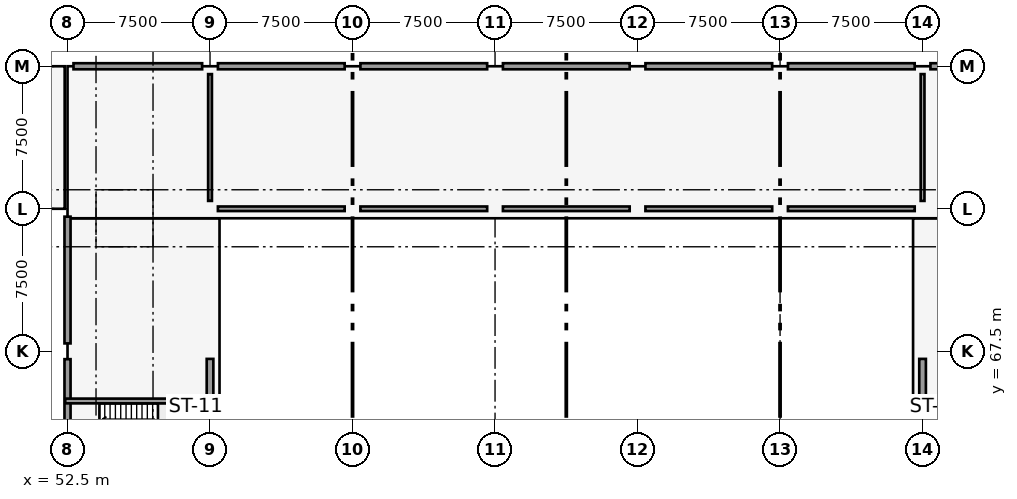
"""IFC4 building model, lengths in metres.
Left out: names, types, materials, properties, quantities, classifications, styles, units other than length and angle.
Written with IfcOpenShell. Run it as: python <this file> out.ifc"""

import sys

from ifc_helpers import new_model, si_unit, direction, frame, frame_2d, origin, origin_2d, place, context, subcontext, project, spatial, rectangle, extrude, element, fill, save


model = new_model("IFC4")
c1 = context("Model", 3, precision=1e-05, world=origin(), true_north=direction((0.0, 1.0)))
c2 = subcontext(c1, "Body", "Model", "MODEL_VIEW")
j1 = project(units=[si_unit("LENGTHUNIT", "METRE"), si_unit("PLANEANGLEUNIT", "RADIAN")], contexts=[c1])
p1 = place(None, origin())
s1 = spatial("IfcSite", under=j1, at=p1, CompositionType="ELEMENT")
p2 = place(p1, origin())
s2 = spatial("IfcBuilding", under=s1, at=p2, CompositionType="ELEMENT")
p3 = place(p2, frame((0.0, 0.0, 9.0)))
s3 = spatial("IfcBuildingStorey", under=s2, at=p3, CompositionType="ELEMENT", Elevation=9.0)
for number, where, z_axis, x_axis in (
    (1, (52.5, 67.5, 0.0), (0.0, 0.0, 1.0), (1.0, 0.0, 0.0)),
    (2, (52.5, 75.0, 0.0), (0.0, 0.0, 1.0), (1.0, 0.0, 0.0)),
):
    element("IfcColumn", number, at=place(p3, frame(where, z_axis=z_axis, x_axis=x_axis)), inside=s3, PredefinedType="COLUMN", context=c2, shape_type="SweptSolid", body=[
        extrude(rectangle(XDim=0.8, YDim=0.8, at=origin_2d()), origin(), (0.0, 0.0, 1.0), 4.2),
    ])
p4 = place(p3, frame((52.5, 82.5, 0.0), z_axis=(0.0, 0.0, 1.0), x_axis=(1.0, 0.0, 0.0)))
e3 = element("IfcColumn", 3, at=p4, inside=s3, PredefinedType="COLUMN", context=c2, shape_type="SweptSolid", body=[
    extrude(rectangle(XDim=0.6, YDim=1.1, at=origin_2d()), origin(), (0.0, 0.0, 1.0), 4.2),
])
for number, where, z_axis, x_axis in (
    (4, (60.0, 67.5, 0.0), (0.0, 0.0, 1.0), (1.0, 0.0, 0.0)),
    (5, (60.0, 75.0, 0.0), (0.0, 0.0, 1.0), (1.0, 0.0, 0.0)),
    (6, (60.0, 82.5, 0.0), (0.0, 0.0, 1.0), (1.0, 0.0, 0.0)),
    (7, (67.5, 75.0, 0.0), (0.0, 0.0, 1.0), (1.0, 0.0, 0.0)),
    (8, (67.5, 82.5, 0.0), (0.0, 0.0, 1.0), (1.0, 0.0, 0.0)),
    (9, (75.0, 75.0, 0.0), (0.0, 0.0, 1.0), (1.0, 0.0, 0.0)),
    (10, (75.0, 82.5, 0.0), (0.0, 0.0, 1.0), (1.0, 0.0, 0.0)),
    (11, (82.5, 75.0, 0.0), (0.0, 0.0, 1.0), (1.0, 0.0, 0.0)),
    (12, (82.5, 82.5, 0.0), (0.0, 0.0, 1.0), (1.0, 0.0, 0.0)),
    (13, (90.0, 75.0, 0.0), (0.0, 0.0, 1.0), (1.0, 0.0, 0.0)),
    (14, (90.0, 82.5, 0.0), (0.0, 0.0, 1.0), (1.0, 0.0, 0.0)),
    (15, (97.5, 67.5, 0.0), (0.0, 0.0, 1.0), (1.0, 0.0, 0.0)),
    (16, (97.5, 75.0, 0.0), (0.0, 0.0, 1.0), (1.0, 0.0, 0.0)),
    (17, (97.5, 82.5, 0.0), (0.0, 0.0, 1.0), (1.0, 0.0, 0.0)),
):
    element("IfcColumn", number, at=place(p3, frame(where, z_axis=z_axis, x_axis=x_axis)), inside=s3, PredefinedType="COLUMN", context=c2, shape_type="SweptSolid", body=[
        extrude(rectangle(XDim=0.8, YDim=0.8, at=origin_2d()), origin(), (0.0, 0.0, 1.0), 4.2),
    ])
p5 = place(p3, frame((60.0, 60.4, 0.0), z_axis=(0.0, 0.0, 1.0), x_axis=(0.0, 1.0, 0.0)))
e18 = element("IfcWall", 18, at=p5, inside=s3, PredefinedType="SHEAR", context=c2, shape_type="SweptSolid", body=[
    extrude(rectangle(XDim=6.7, YDim=0.35, at=frame_2d((3.35, 0.0))), origin(), (0.0, 0.0, 1.0), 2.85),
])
p6 = place(p3, frame((97.5, 60.4, 0.0), z_axis=(0.0, 0.0, 1.0), x_axis=(0.0, 1.0, 0.0)))
e19 = element("IfcWall", 19, at=p6, inside=s3, PredefinedType="SHEAR", context=c2, shape_type="SweptSolid", body=[
    extrude(rectangle(XDim=6.7, YDim=0.35, at=frame_2d((3.35, 0.0))), origin(), (0.0, 0.0, 1.0), 3.0),
])
p7 = place(p3, frame((52.5, 60.415, 0.0), z_axis=(0.0, 0.0, 1.0), x_axis=(0.0, 1.0, 0.0)))
e20 = element("IfcWall", 20, at=p7, inside=s3, PredefinedType="SOLIDWALL", context=c2, shape_type="SweptSolid", body=[
    extrude(rectangle(XDim=6.67, YDim=0.32, at=frame_2d((3.335, 0.0))), origin(), (0.0, 0.0, 1.0), 2.82),
])
p8 = place(p3, frame((52.5, 67.915, 0.0), z_axis=(0.0, 0.0, 1.0), x_axis=(0.0, 1.0, 0.0)))
e21 = element("IfcWall", 21, at=p8, inside=s3, PredefinedType="SOLIDWALL", context=c2, shape_type="SweptSolid", body=[
    extrude(rectangle(XDim=6.67, YDim=0.32, at=frame_2d((3.335, 0.0))), origin(), (0.0, 0.0, 1.0), 2.92),
])
p9 = place(p3, frame((52.815, 82.5, 0.0), z_axis=(0.0, 0.0, 1.0), x_axis=(1.0, 0.0, 0.0)))
e22 = element("IfcWall", 22, at=p9, inside=s3, PredefinedType="SOLIDWALL", context=c2, shape_type="SweptSolid", body=[
    extrude(rectangle(XDim=6.77, YDim=0.32, at=frame_2d((3.385, 0.0))), origin(), (0.0, 0.0, 1.0), 3.12),
])
p10 = place(p9, frame((2.86, 0.0, 0.6)))
e23 = element("IfcOpeningElement", 23, at=p10, cuts=e22, PredefinedType="OPENING", context=c2, shape_type="SweptSolid", body=[
    extrude(rectangle(XDim=1.15, YDim=1.3, at=frame_2d((0.575, 0.65))), frame((0.0, 0.17, 0.0), z_axis=(0.0, -1.0, 0.0), x_axis=(1.0, 0.0, 0.0)), (0.0, 0.0, 1.0), 0.34),
])
p11 = place(p3, frame((60.415, 82.5, 0.0), z_axis=(0.0, 0.0, 1.0), x_axis=(1.0, 0.0, 0.0)))
e24 = element("IfcWall", 24, at=p11, inside=s3, PredefinedType="SOLIDWALL", context=c2, shape_type="SweptSolid", body=[
    extrude(rectangle(XDim=6.67, YDim=0.32, at=frame_2d((3.335, 0.0))), origin(), (0.0, 0.0, 1.0), 3.12),
])
p12 = place(p11, frame((2.685, 0.0, 0.6)))
e25 = element("IfcOpeningElement", 25, at=p12, cuts=e24, PredefinedType="OPENING", context=c2, shape_type="SweptSolid", body=[
    extrude(rectangle(XDim=1.3, YDim=1.3, at=frame_2d((0.65, 0.65))), frame((0.0, 0.17, 0.0), z_axis=(0.0, -1.0, 0.0), x_axis=(1.0, 0.0, 0.0)), (0.0, 0.0, 1.0), 0.34),
])
p13 = place(p3, frame((67.915, 82.5, 0.0), z_axis=(0.0, 0.0, 1.0), x_axis=(1.0, 0.0, 0.0)))
e26 = element("IfcWall", 26, at=p13, inside=s3, PredefinedType="SOLIDWALL", context=c2, shape_type="SweptSolid", body=[
    extrude(rectangle(XDim=6.67, YDim=0.32, at=frame_2d((3.335, 0.0))), origin(), (0.0, 0.0, 1.0), 3.12),
])
p14 = place(p3, frame((75.415, 82.5, 0.0), z_axis=(0.0, 0.0, 1.0), x_axis=(1.0, 0.0, 0.0)))
e27 = element("IfcWall", 27, at=p14, inside=s3, PredefinedType="SOLIDWALL", context=c2, shape_type="SweptSolid", body=[
    extrude(rectangle(XDim=6.67, YDim=0.32, at=frame_2d((3.335, 0.0))), origin(), (0.0, 0.0, 1.0), 3.12),
])
p15 = place(p14, frame((2.535, 0.0, 0.6)))
e28 = element("IfcOpeningElement", 28, at=p15, cuts=e27, PredefinedType="OPENING", context=c2, shape_type="SweptSolid", body=[
    extrude(rectangle(XDim=1.6, YDim=1.3, at=frame_2d((0.8, 0.65))), frame((0.0, 0.17, 0.0), z_axis=(0.0, -1.0, 0.0), x_axis=(1.0, 0.0, 0.0)), (0.0, 0.0, 1.0), 0.34),
])
p16 = place(p3, frame((82.915, 82.5, 0.0), z_axis=(0.0, 0.0, 1.0), x_axis=(1.0, 0.0, 0.0)))
e29 = element("IfcWall", 29, at=p16, inside=s3, PredefinedType="SOLIDWALL", context=c2, shape_type="SweptSolid", body=[
    extrude(rectangle(XDim=6.67, YDim=0.32, at=frame_2d((3.335, 0.0))), origin(), (0.0, 0.0, 1.0), 3.12),
])
p17 = place(p3, frame((90.415, 82.5, 0.0), z_axis=(0.0, 0.0, 1.0), x_axis=(1.0, 0.0, 0.0)))
e30 = element("IfcWall", 30, at=p17, inside=s3, PredefinedType="SOLIDWALL", context=c2, shape_type="SweptSolid", body=[
    extrude(rectangle(XDim=6.67, YDim=0.32, at=frame_2d((3.335, 0.0))), origin(), (0.0, 0.0, 1.0), 3.12),
])
p18 = place(p17, frame((2.36, 0.0, 0.6)))
e31 = element("IfcOpeningElement", 31, at=p18, cuts=e30, PredefinedType="OPENING", context=c2, shape_type="SweptSolid", body=[
    extrude(rectangle(XDim=1.95, YDim=1.3, at=frame_2d((0.975, 0.65))), frame((0.0, 0.17, 0.0), z_axis=(0.0, -1.0, 0.0), x_axis=(1.0, 0.0, 0.0)), (0.0, 0.0, 1.0), 0.34),
])
p19 = place(p3, frame((97.915, 82.5, 0.0), z_axis=(0.0, 0.0, 1.0), x_axis=(1.0, 0.0, 0.0)))
e32 = element("IfcWall", 32, at=p19, inside=s3, PredefinedType="SOLIDWALL", context=c2, shape_type="SweptSolid", body=[
    extrude(rectangle(XDim=6.78, YDim=0.32, at=frame_2d((3.39, 0.0))), origin(), (0.0, 0.0, 1.0), 3.12),
])
p20 = place(p19, frame((2.285, 0.0, 0.6)))
e33 = element("IfcOpeningElement", 33, at=p20, cuts=e32, PredefinedType="OPENING", context=c2, shape_type="SweptSolid", body=[
    extrude(rectangle(XDim=2.1, YDim=1.3, at=frame_2d((1.05, 0.65))), frame((0.0, 0.17, 0.0), z_axis=(0.0, -1.0, 0.0), x_axis=(1.0, 0.0, 0.0)), (0.0, 0.0, 1.0), 0.34),
])
p21 = place(p3, frame((52.38, 64.885, 0.0), z_axis=(0.0, 0.0, 1.0), x_axis=(1.0, 0.0, 0.0)))
e34 = element("IfcWall", 34, at=p21, inside=s3, PredefinedType="SOLIDWALL", context=c2, shape_type="SweptSolid", body=[
    extrude(rectangle(XDim=7.26, YDim=0.25, at=frame_2d((3.63, 0.0))), origin(), (0.0, 0.0, 1.0), 3.92),
])
p22 = place(p21, frame((0.62, 0.0, 0.0)))
e35 = element("IfcOpeningElement", 35, at=p22, cuts=e34, PredefinedType="OPENING", context=c2, shape_type="SweptSolid", body=[
    extrude(rectangle(XDim=1.1, YDim=2.15, at=frame_2d((0.55, 1.075))), frame((0.0, 0.135, 0.0), z_axis=(0.0, -1.0, 0.0), x_axis=(1.0, 0.0, 0.0)), (0.0, 0.0, 1.0), 0.27),
])
p23 = place(p3, frame((59.645, 61.2, 0.0), z_axis=(0.0, 0.0, 1.0), x_axis=(0.0, 1.0, 0.0)))
e36 = element("IfcWall", 36, at=p23, inside=s3, PredefinedType="SOLIDWALL", context=c2, shape_type="SweptSolid", body=[
    extrude(rectangle(XDim=3.56, YDim=0.25, at=frame_2d((1.78, 0.0))), origin(), (0.0, 0.0, 1.0), 3.92),
])
p24 = place(p3, frame((97.86, 64.885, 0.0), z_axis=(0.0, 0.0, 1.0), x_axis=(1.0, 0.0, 0.0)))
e37 = element("IfcWall", 37, at=p24, inside=s3, PredefinedType="SOLIDWALL", context=c2, shape_type="SweptSolid", body=[
    extrude(rectangle(XDim=7.26, YDim=0.25, at=frame_2d((3.63, 0.0))), origin(), (0.0, 0.0, 1.0), 3.92),
])
p25 = place(p24, frame((5.54, 0.0, 0.0)))
e38 = element("IfcOpeningElement", 38, at=p25, cuts=e37, PredefinedType="OPENING", context=c2, shape_type="SweptSolid", body=[
    extrude(rectangle(XDim=1.1, YDim=2.15, at=frame_2d((0.55, 1.075))), frame((0.0, 0.135, 0.0), z_axis=(0.0, -1.0, 0.0), x_axis=(1.0, 0.0, 0.0)), (0.0, 0.0, 1.0), 0.27),
])
p26 = place(p3, frame((97.855, 61.2, 0.0), z_axis=(0.0, 0.0, 1.0), x_axis=(0.0, 1.0, 0.0)))
e39 = element("IfcWall", 39, at=p26, inside=s3, PredefinedType="SOLIDWALL", context=c2, shape_type="SweptSolid", body=[
    extrude(rectangle(XDim=3.56, YDim=0.25, at=frame_2d((1.78, 0.0))), origin(), (0.0, 0.0, 1.0), 3.92),
])
p27 = place(p3, frame((60.414, 75.0, 0.0), z_axis=(0.0, 0.0, 1.0), x_axis=(1.0, 0.0, 0.0)))
e40 = element("IfcWall", 40, at=p27, inside=s3, PredefinedType="PARTITIONING", context=c2, shape_type="SweptSolid", body=[
    extrude(rectangle(XDim=6.672, YDim=0.24, at=frame_2d((3.336, 0.0))), origin(), (0.0, 0.0, 1.0), 2.92),
])
for number, where, z_axis, x_axis in (
    (41, (67.914, 75.0, 0.0), (0.0, 0.0, 1.0), (1.0, 0.0, 0.0)),
    (42, (75.414, 75.0, 0.0), (0.0, 0.0, 1.0), (1.0, 0.0, 0.0)),
    (43, (82.914, 75.0, 0.0), (0.0, 0.0, 1.0), (1.0, 0.0, 0.0)),
    (44, (90.414, 75.0, 0.0), (0.0, 0.0, 1.0), (1.0, 0.0, 0.0)),
):
    element("IfcWall", number, at=place(p3, frame(where, z_axis=z_axis, x_axis=x_axis)), inside=s3, PredefinedType="PARTITIONING", context=c2, shape_type="SweptSolid", body=[
        extrude(rectangle(XDim=6.672, YDim=0.24, at=frame_2d((3.336, 0.0))), origin(), (0.0, 0.0, 1.0), 2.82),
    ])
p28 = place(p3, frame((60.0, 75.414, 0.0), z_axis=(0.0, 0.0, 1.0), x_axis=(0.0, 1.0, 0.0)))
e45 = element("IfcWall", 45, at=p28, inside=s3, PredefinedType="PARTITIONING", context=c2, shape_type="SweptSolid", body=[
    extrude(rectangle(XDim=6.672, YDim=0.2, at=frame_2d((3.336, 0.0))), origin(), (0.0, 0.0, 1.0), 2.92),
])
p29 = place(p28, frame((2.536, 0.0, 0.0)))
e46 = element("IfcOpeningElement", 46, at=p29, cuts=e45, PredefinedType="OPENING", context=c2, shape_type="SweptSolid", body=[
    extrude(rectangle(XDim=1.6, YDim=2.15, at=frame_2d((0.8, 1.075))), frame((0.0, 0.11, 0.0), z_axis=(0.0, -1.0, 0.0), x_axis=(1.0, 0.0, 0.0)), (0.0, 0.0, 1.0), 0.22),
])
p30 = place(p3, frame((97.5, 75.414, 0.0), z_axis=(0.0, 0.0, 1.0), x_axis=(0.0, 1.0, 0.0)))
e47 = element("IfcWall", 47, at=p30, inside=s3, PredefinedType="PARTITIONING", context=c2, shape_type="SweptSolid", body=[
    extrude(rectangle(XDim=6.672, YDim=0.2, at=frame_2d((3.336, 0.0))), origin(), (0.0, 0.0, 1.0), 2.82),
])
p31 = place(p30, frame((2.536, 0.0, 0.0)))
e48 = element("IfcOpeningElement", 48, at=p31, cuts=e47, PredefinedType="OPENING", context=c2, shape_type="SweptSolid", body=[
    extrude(rectangle(XDim=1.6, YDim=2.15, at=frame_2d((0.8, 1.075))), frame((0.0, 0.11, 0.0), z_axis=(0.0, -1.0, 0.0), x_axis=(1.0, 0.0, 0.0)), (0.0, 0.0, 1.0), 0.22),
])
p32 = place(p10, origin())
e49 = element("IfcWindow", 49, at=p32, inside=s3, PartitioningType="SINGLE_PANEL", PredefinedType="WINDOW", context=c2, shape_type="SweptSolid", body=[
    extrude(rectangle(XDim=1.15, YDim=1.3, at=frame_2d((0.575, 0.65))), frame((0.0, 0.03, 0.0), z_axis=(0.0, -1.0, 0.0), x_axis=(1.0, 0.0, 0.0)), (0.0, 0.0, 1.0), 0.06),
])
fill(e23, e49)
p33 = place(p12, origin())
e50 = element("IfcWindow", 50, at=p33, inside=s3, PartitioningType="SINGLE_PANEL", PredefinedType="WINDOW", context=c2, shape_type="SweptSolid", body=[
    extrude(rectangle(XDim=1.3, YDim=1.3, at=frame_2d((0.65, 0.65))), frame((0.0, 0.03, 0.0), z_axis=(0.0, -1.0, 0.0), x_axis=(1.0, 0.0, 0.0)), (0.0, 0.0, 1.0), 0.06),
])
fill(e25, e50)
p34 = place(p15, origin())
e51 = element("IfcWindow", 51, at=p34, inside=s3, PartitioningType="SINGLE_PANEL", PredefinedType="WINDOW", context=c2, shape_type="SweptSolid", body=[
    extrude(rectangle(XDim=1.6, YDim=1.3, at=frame_2d((0.8, 0.65))), frame((0.0, 0.03, 0.0), z_axis=(0.0, -1.0, 0.0), x_axis=(1.0, 0.0, 0.0)), (0.0, 0.0, 1.0), 0.06),
])
fill(e28, e51)
p35 = place(p18, origin())
e52 = element("IfcWindow", 52, at=p35, inside=s3, PartitioningType="SINGLE_PANEL", PredefinedType="WINDOW", context=c2, shape_type="SweptSolid", body=[
    extrude(rectangle(XDim=1.95, YDim=1.3, at=frame_2d((0.975, 0.65))), frame((0.0, 0.03, 0.0), z_axis=(0.0, -1.0, 0.0), x_axis=(1.0, 0.0, 0.0)), (0.0, 0.0, 1.0), 0.06),
])
fill(e31, e52)
p36 = place(p22, frame((1.1, 0.0, 0.0), z_axis=(0.0, 0.0, 1.0), x_axis=(-1.0, 0.0, 0.0)))
e53 = element("IfcDoor", 53, at=p36, inside=s3, OperationType="SINGLE_SWING_RIGHT", PredefinedType="DOOR", context=c2, shape_type="SweptSolid", body=[
    extrude(rectangle(XDim=1.1, YDim=2.15, at=frame_2d((0.55, 1.075))), frame((0.0, 0.025, 0.0), z_axis=(0.0, -1.0, 0.0), x_axis=(1.0, 0.0, 0.0)), (0.0, 0.0, 1.0), 0.05),
])
fill(e35, e53)
p37 = place(p29, origin())
e54 = element("IfcDoor", 54, at=p37, inside=s3, OperationType="SINGLE_SWING_RIGHT", PredefinedType="DOOR", context=c2, shape_type="SweptSolid", body=[
    extrude(rectangle(XDim=1.6, YDim=2.15, at=frame_2d((0.8, 1.075))), frame((0.0, 0.025, 0.0), z_axis=(0.0, -1.0, 0.0), x_axis=(1.0, 0.0, 0.0)), (0.0, 0.0, 1.0), 0.05),
])
fill(e46, e54)
p38 = place(p31, origin())
e55 = element("IfcDoor", 55, at=p38, inside=s3, OperationType="SINGLE_SWING_LEFT", PredefinedType="DOOR", context=c2, shape_type="SweptSolid", body=[
    extrude(rectangle(XDim=1.6, YDim=2.15, at=frame_2d((0.8, 1.075))), frame((0.0, 0.025, 0.0), z_axis=(0.0, -1.0, 0.0), x_axis=(1.0, 0.0, 0.0)), (0.0, 0.0, 1.0), 0.05),
])
fill(e48, e55)
save(model, sys.argv[1])
